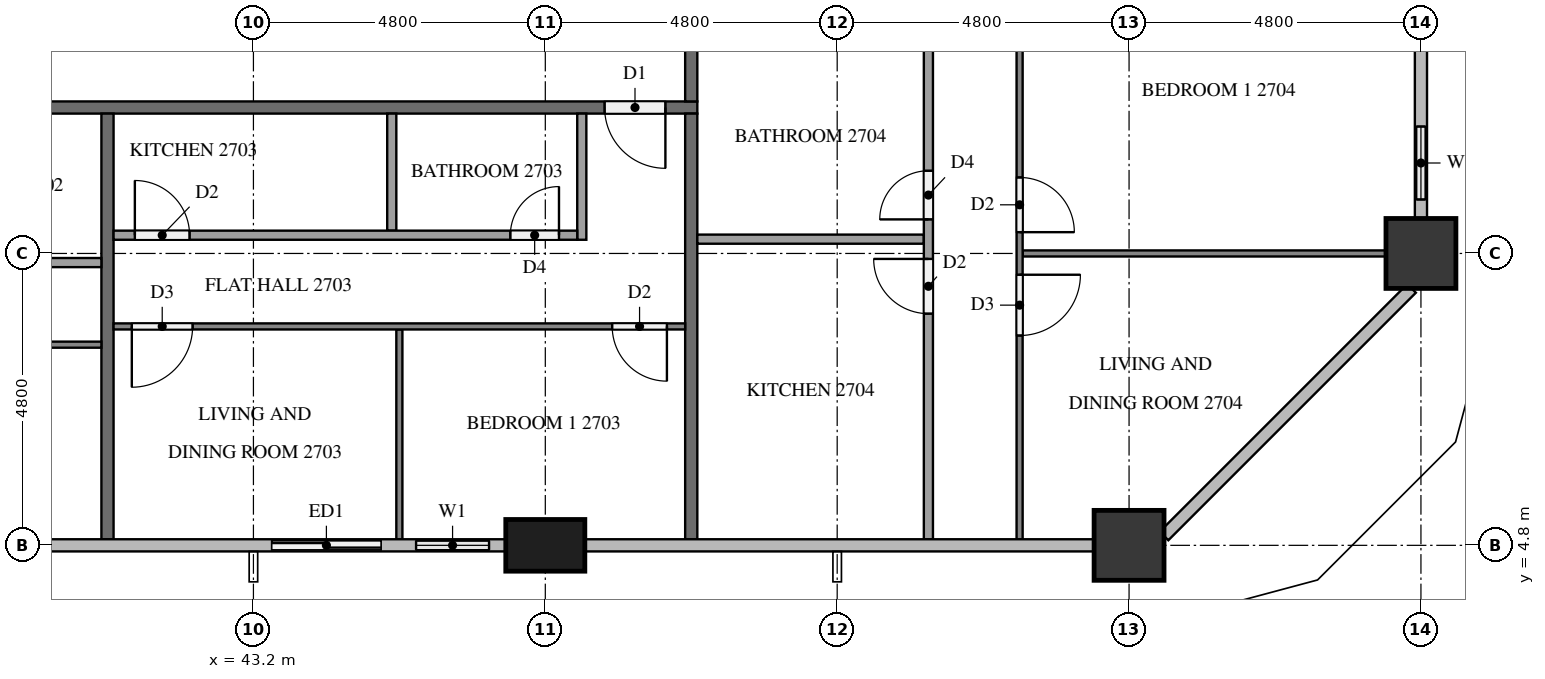
"""IFC4 building model, lengths in metres.
Left out: names, types, materials, properties, quantities, classifications, styles, units other than length and angle.
Written with IfcOpenShell. Run it as: python <this file> out.ifc"""

import sys

from ifc_helpers import new_model, si_unit, direction, frame, frame_2d, origin, origin_2d, place, context, subcontext, project, spatial, rectangle, extrude, element, fill, save


model = new_model("IFC4")
c1 = context("Model", 3, precision=1e-05, world=origin(), true_north=direction((0.0, 1.0)))
c2 = subcontext(c1, "Body", "Model", "MODEL_VIEW")
j1 = project(units=[si_unit("LENGTHUNIT", "METRE"), si_unit("PLANEANGLEUNIT", "RADIAN")], contexts=[c1])
p1 = place(None, origin())
s1 = spatial("IfcSite", under=j1, at=p1, CompositionType="ELEMENT")
p2 = place(p1, origin())
s2 = spatial("IfcBuilding", under=s1, at=p2, CompositionType="ELEMENT")
p3 = place(p2, frame((0.0, 0.0, 106.7)))
s3 = spatial("IfcBuildingStorey", under=s2, at=p3, CompositionType="ELEMENT", Elevation=106.7)
p4 = place(p3, frame((48.0, 4.8, 0.0), z_axis=(0.0, 0.0, 1.0), x_axis=(1.0, 0.0, 0.0)))
e1 = element("IfcColumn", 1, at=p4, inside=s3, PredefinedType="COLUMN", context=c2, shape_type="SweptSolid", body=[
    extrude(rectangle(XDim=1.3, YDim=0.85, at=origin_2d()), origin(), (0.0, 0.0, 1.0), 3.2),
])
for number, where, z_axis, x_axis in (
    (2, (57.6, 4.8, 0.0), (0.0, 0.0, 1.0), (1.0, 0.0, 0.0)),
    (3, (62.4, 9.6, 0.0), (0.0, 0.0, 1.0), (1.0, 0.0, 0.0)),
):
    element("IfcColumn", number, at=place(p3, frame(where, z_axis=z_axis, x_axis=x_axis)), inside=s3, PredefinedType="COLUMN", context=c2, shape_type="SweptSolid", body=[
        extrude(rectangle(XDim=1.15, YDim=1.15, at=origin_2d()), origin(), (0.0, 0.0, 1.0), 3.2),
    ])
p5 = place(p3, frame((43.2, 4.8, 0.0), z_axis=(0.0, 0.0, 1.0), x_axis=(1.0, 0.0, 0.0)))
e4 = element("IfcWall", 4, at=p5, inside=s3, PredefinedType="SOLIDWALL", context=c2, shape_type="SweptSolid", body=[
    extrude(rectangle(XDim=4.15, YDim=0.15, at=frame_2d((2.075, 0.0))), origin(), (0.0, 0.0, 1.0), 3.2),
])
p6 = place(p5, frame((0.3, 0.0, 0.0)))
e5 = element("IfcOpeningElement", 5, at=p6, cuts=e4, PredefinedType="OPENING", context=c2, shape_type="SweptSolid", body=[
    extrude(rectangle(XDim=1.8, YDim=2.4, at=frame_2d((0.9, 1.2))), frame((0.0, 0.085, 0.0), z_axis=(0.0, -1.0, 0.0), x_axis=(1.0, 0.0, 0.0)), (0.0, 0.0, 1.0), 0.17),
])
p7 = place(p5, frame((2.675, 0.0, 0.9)))
e6 = element("IfcOpeningElement", 6, at=p7, cuts=e4, PredefinedType="OPENING", context=c2, shape_type="SweptSolid", body=[
    extrude(rectangle(XDim=1.2, YDim=1.4, at=frame_2d((0.6, 0.7))), frame((0.0, 0.085, 0.0), z_axis=(0.0, -1.0, 0.0), x_axis=(1.0, 0.0, 0.0)), (0.0, 0.0, 1.0), 0.17),
])
p8 = place(p3, frame((62.4, 10.175, 0.0), z_axis=(0.0, 0.0, 1.0), x_axis=(0.0, 1.0, 0.0)))
e7 = element("IfcWall", 7, at=p8, inside=s3, PredefinedType="SOLIDWALL", context=c2, shape_type="SweptSolid", body=[
    extrude(rectangle(XDim=1.825, YDim=0.15, at=frame_2d((0.913, 0.0))), origin(), (0.0, 0.0, 1.0), 3.2),
])
p9 = place(p8, frame((0.312, 0.0, 0.9)))
e8 = element("IfcOpeningElement", 8, at=p9, cuts=e7, PredefinedType="OPENING", context=c2, shape_type="SweptSolid", body=[
    extrude(rectangle(XDim=1.2, YDim=1.4, at=frame_2d((0.6, 0.7))), frame((0.0, 0.085, 0.0), z_axis=(0.0, -1.0, 0.0), x_axis=(1.0, 0.0, 0.0)), (0.0, 0.0, 1.0), 0.17),
])
p10 = place(p3, frame((50.5, 12.0, 0.0), z_axis=(0.0, 0.0, 1.0), x_axis=(-1.0, 0.0, 0.0)))
e9 = element("IfcWall", 9, at=p10, inside=s3, PredefinedType="PARTITIONING", context=c2, shape_type="SweptSolid", body=[
    extrude(rectangle(XDim=38.6, YDim=0.2, at=frame_2d((19.3, 0.0))), origin(), (0.0, 0.0, 1.0), 3.2),
])
p11 = place(p10, frame((37.075, 0.0, 0.0)))
e10 = element("IfcOpeningElement", 10, at=p11, cuts=e9, PredefinedType="OPENING", context=c2, shape_type="SweptSolid", body=[
    extrude(rectangle(XDim=1.0, YDim=2.1, at=frame_2d((0.5, 1.05))), frame((0.0, 0.11, 0.0), z_axis=(0.0, -1.0, 0.0), x_axis=(1.0, 0.0, 0.0)), (0.0, 0.0, 1.0), 0.22),
])
p12 = place(p10, frame((22.675, 0.0, 0.0)))
e11 = element("IfcOpeningElement", 11, at=p12, cuts=e9, PredefinedType="OPENING", context=c2, shape_type="SweptSolid", body=[
    extrude(rectangle(XDim=1.0, YDim=2.1, at=frame_2d((0.5, 1.05))), frame((0.0, 0.11, 0.0), z_axis=(0.0, -1.0, 0.0), x_axis=(1.0, 0.0, 0.0)), (0.0, 0.0, 1.0), 0.22),
])
p13 = place(p10, frame((0.525, 0.0, 0.0)))
e12 = element("IfcOpeningElement", 12, at=p13, cuts=e9, PredefinedType="OPENING", context=c2, shape_type="SweptSolid", body=[
    extrude(rectangle(XDim=1.0, YDim=2.1, at=frame_2d((0.5, 1.05))), frame((0.0, 0.11, 0.0), z_axis=(0.0, -1.0, 0.0), x_axis=(1.0, 0.0, 0.0)), (0.0, 0.0, 1.0), 0.22),
])
p14 = place(p3, frame((50.4, 14.9, 0.0), z_axis=(0.0, 0.0, 1.0), x_axis=(0.0, -1.0, 0.0)))
e13 = element("IfcWall", 13, at=p14, inside=s3, PredefinedType="PARTITIONING", context=c2, shape_type="SweptSolid", body=[
    extrude(rectangle(XDim=2.8, YDim=0.2, at=frame_2d((1.4, 0.0))), origin(), (0.0, 0.0, 1.0), 3.2),
])
p15 = place(p14, frame((0.325, 0.0, 0.0)))
e14 = element("IfcOpeningElement", 14, at=p15, cuts=e13, PredefinedType="OPENING", context=c2, shape_type="SweptSolid", body=[
    extrude(rectangle(XDim=1.0, YDim=2.1, at=frame_2d((0.5, 1.05))), frame((0.0, 0.11, 0.0), z_axis=(0.0, -1.0, 0.0), x_axis=(1.0, 0.0, 0.0)), (0.0, 0.0, 1.0), 0.22),
])
for number, where, z_axis, x_axis in (
    (15, (40.8, 11.9, 0.0), (0.0, 0.0, 1.0), (0.0, -1.0, 0.0)),
    (16, (50.4, 11.9, 0.0), (0.0, 0.0, 1.0), (0.0, -1.0, 0.0)),
):
    element("IfcWall", number, at=place(p3, frame(where, z_axis=z_axis, x_axis=x_axis)), inside=s3, PredefinedType="PARTITIONING", context=c2, shape_type="SweptSolid", body=[
        extrude(rectangle(XDim=7.0, YDim=0.2, at=frame_2d((3.5, 0.0))), origin(), (0.0, 0.0, 1.0), 3.2),
    ])
p16 = place(p3, frame((40.7, 8.1, 0.0), z_axis=(0.0, 0.0, 1.0), x_axis=(-1.0, 0.0, 0.0)))
e17 = element("IfcWall", 17, at=p16, inside=s3, PredefinedType="PARTITIONING", context=c2, shape_type="SweptSolid", body=[
    extrude(rectangle(XDim=14.2, YDim=0.1, at=frame_2d((7.1, 0.0))), origin(), (0.0, 0.0, 1.0), 3.2),
])
p17 = place(p16, frame((13.0, 0.0, 0.0)))
e18 = element("IfcOpeningElement", 18, at=p17, cuts=e17, PredefinedType="OPENING", context=c2, shape_type="SweptSolid", body=[
    extrude(rectangle(XDim=0.9, YDim=2.1, at=frame_2d((0.45, 1.05))), frame((0.0, 0.06, 0.0), z_axis=(0.0, -1.0, 0.0), x_axis=(1.0, 0.0, 0.0)), (0.0, 0.0, 1.0), 0.12),
])
p18 = place(p16, frame((5.05, 0.0, 0.0)))
e19 = element("IfcOpeningElement", 19, at=p18, cuts=e17, PredefinedType="OPENING", context=c2, shape_type="SweptSolid", body=[
    extrude(rectangle(XDim=1.0, YDim=2.1, at=frame_2d((0.5, 1.05))), frame((0.0, 0.06, 0.0), z_axis=(0.0, -1.0, 0.0), x_axis=(1.0, 0.0, 0.0)), (0.0, 0.0, 1.0), 0.12),
])
p19 = place(p16, frame((3.45, 0.0, 0.0)))
e20 = element("IfcOpeningElement", 20, at=p19, cuts=e17, PredefinedType="OPENING", context=c2, shape_type="SweptSolid", body=[
    extrude(rectangle(XDim=0.9, YDim=2.1, at=frame_2d((0.45, 1.05))), frame((0.0, 0.06, 0.0), z_axis=(0.0, -1.0, 0.0), x_axis=(1.0, 0.0, 0.0)), (0.0, 0.0, 1.0), 0.12),
])
p20 = place(p3, frame((28.275, 9.45, 0.0), z_axis=(0.0, 0.0, 1.0), x_axis=(1.0, 0.0, 0.0)))
e21 = element("IfcWall", 21, at=p20, inside=s3, PredefinedType="PARTITIONING", context=c2, shape_type="SweptSolid", body=[
    extrude(rectangle(XDim=12.425, YDim=0.15, at=frame_2d((6.212, 0.0))), origin(), (0.0, 0.0, 1.0), 3.2),
])
p21 = place(p20, frame((0.3, 0.0, 0.0)))
e22 = element("IfcOpeningElement", 22, at=p21, cuts=e21, PredefinedType="OPENING", context=c2, shape_type="SweptSolid", body=[
    extrude(rectangle(XDim=0.8, YDim=2.1, at=frame_2d((0.4, 1.05))), frame((0.0, 0.085, 0.0), z_axis=(0.0, -1.0, 0.0), x_axis=(1.0, 0.0, 0.0)), (0.0, 0.0, 1.0), 0.17),
])
p22 = place(p20, frame((7.377, 0.0, 0.0)))
e23 = element("IfcOpeningElement", 23, at=p22, cuts=e21, PredefinedType="OPENING", context=c2, shape_type="SweptSolid", body=[
    extrude(rectangle(XDim=0.9, YDim=2.1, at=frame_2d((0.45, 1.05))), frame((0.0, 0.085, 0.0), z_axis=(0.0, -1.0, 0.0), x_axis=(1.0, 0.0, 0.0)), (0.0, 0.0, 1.0), 0.17),
])
p23 = place(p20, frame((8.927, 0.0, 0.0)))
e24 = element("IfcOpeningElement", 24, at=p23, cuts=e21, PredefinedType="OPENING", context=c2, shape_type="SweptSolid", body=[
    extrude(rectangle(XDim=0.9, YDim=2.1, at=frame_2d((0.45, 1.05))), frame((0.0, 0.085, 0.0), z_axis=(0.0, -1.0, 0.0), x_axis=(1.0, 0.0, 0.0)), (0.0, 0.0, 1.0), 0.17),
])
p24 = place(p3, frame((45.6, 8.35, 0.0), z_axis=(0.0, 0.0, 1.0), x_axis=(0.0, -1.0, 0.0)))
e25 = element("IfcWall", 25, at=p24, inside=s3, PredefinedType="PARTITIONING", context=c2, shape_type="SweptSolid", body=[
    extrude(rectangle(XDim=3.45, YDim=0.1, at=frame_2d((1.725, 0.0))), origin(), (0.0, 0.0, 1.0), 3.2),
])
p25 = place(p3, frame((50.3, 8.4, 0.0), z_axis=(0.0, 0.0, 1.0), x_axis=(-1.0, 0.0, 0.0)))
e26 = element("IfcWall", 26, at=p25, inside=s3, PredefinedType="PARTITIONING", context=c2, shape_type="SweptSolid", body=[
    extrude(rectangle(XDim=9.4, YDim=0.1, at=frame_2d((4.7, 0.0))), origin(), (0.0, 0.0, 1.0), 3.2),
])
p26 = place(p25, frame((0.3, 0.0, 0.0)))
e27 = element("IfcOpeningElement", 27, at=p26, cuts=e26, PredefinedType="OPENING", context=c2, shape_type="SweptSolid", body=[
    extrude(rectangle(XDim=0.9, YDim=2.1, at=frame_2d((0.45, 1.05))), frame((0.0, 0.06, 0.0), z_axis=(0.0, -1.0, 0.0), x_axis=(1.0, 0.0, 0.0)), (0.0, 0.0, 1.0), 0.12),
])
p27 = place(p25, frame((8.1, 0.0, 0.0)))
e28 = element("IfcOpeningElement", 28, at=p27, cuts=e26, PredefinedType="OPENING", context=c2, shape_type="SweptSolid", body=[
    extrude(rectangle(XDim=1.0, YDim=2.1, at=frame_2d((0.5, 1.05))), frame((0.0, 0.06, 0.0), z_axis=(0.0, -1.0, 0.0), x_axis=(1.0, 0.0, 0.0)), (0.0, 0.0, 1.0), 0.12),
])
p28 = place(p3, frame((45.475, 11.9, 0.0), z_axis=(0.0, 0.0, 1.0), x_axis=(0.0, -1.0, 0.0)))
e29 = element("IfcWall", 29, at=p28, inside=s3, PredefinedType="PARTITIONING", context=c2, shape_type="SweptSolid", body=[
    extrude(rectangle(XDim=1.925, YDim=0.15, at=frame_2d((0.962, 0.0))), origin(), (0.0, 0.0, 1.0), 3.2),
])
p29 = place(p3, frame((48.6, 11.9, 0.0), z_axis=(0.0, 0.0, 1.0), x_axis=(0.0, -1.0, 0.0)))
e30 = element("IfcWall", 30, at=p29, inside=s3, PredefinedType="PARTITIONING", context=c2, shape_type="SweptSolid", body=[
    extrude(rectangle(XDim=2.075, YDim=0.15, at=frame_2d((1.038, 0.0))), origin(), (0.0, 0.0, 1.0), 3.2),
])
p30 = place(p3, frame((40.9, 9.9, 0.0), z_axis=(0.0, 0.0, 1.0), x_axis=(1.0, 0.0, 0.0)))
e31 = element("IfcWall", 31, at=p30, inside=s3, PredefinedType="PARTITIONING", context=c2, shape_type="SweptSolid", body=[
    extrude(rectangle(XDim=7.625, YDim=0.15, at=frame_2d((3.812, 0.0))), origin(), (0.0, 0.0, 1.0), 3.2),
])
p31 = place(p30, frame((6.525, 0.0, 0.0)))
e32 = element("IfcOpeningElement", 32, at=p31, cuts=e31, PredefinedType="OPENING", context=c2, shape_type="SweptSolid", body=[
    extrude(rectangle(XDim=0.8, YDim=2.1, at=frame_2d((0.4, 1.05))), frame((0.0, 0.085, 0.0), z_axis=(0.0, -1.0, 0.0), x_axis=(1.0, 0.0, 0.0)), (0.0, 0.0, 1.0), 0.17),
])
p32 = place(p30, frame((0.35, 0.0, 0.0)))
e33 = element("IfcOpeningElement", 33, at=p32, cuts=e31, PredefinedType="OPENING", context=c2, shape_type="SweptSolid", body=[
    extrude(rectangle(XDim=0.9, YDim=2.1, at=frame_2d((0.45, 1.05))), frame((0.0, 0.085, 0.0), z_axis=(0.0, -1.0, 0.0), x_axis=(1.0, 0.0, 0.0)), (0.0, 0.0, 1.0), 0.17),
])
p33 = place(p3, frame((55.85, 9.6, 0.0), z_axis=(0.0, 0.0, 1.0), x_axis=(1.0, 0.0, 0.0)))
e34 = element("IfcWall", 34, at=p33, inside=s3, PredefinedType="PARTITIONING", context=c2, shape_type="SweptSolid", body=[
    extrude(rectangle(XDim=5.975, YDim=0.1, at=frame_2d((2.987, 0.0))), origin(), (0.0, 0.0, 1.0), 3.2),
])
p34 = place(p3, frame((55.8, 14.9, 0.0), z_axis=(0.0, 0.0, 1.0), x_axis=(0.0, -1.0, 0.0)))
e35 = element("IfcWall", 35, at=p34, inside=s3, PredefinedType="PARTITIONING", context=c2, shape_type="SweptSolid", body=[
    extrude(rectangle(XDim=10.0, YDim=0.1, at=frame_2d((5.0, 0.0))), origin(), (0.0, 0.0, 1.0), 3.2),
])
p35 = place(p34, frame((4.05, 0.0, 0.0)))
e36 = element("IfcOpeningElement", 36, at=p35, cuts=e35, PredefinedType="OPENING", context=c2, shape_type="SweptSolid", body=[
    extrude(rectangle(XDim=0.9, YDim=2.1, at=frame_2d((0.45, 1.05))), frame((0.0, 0.06, 0.0), z_axis=(0.0, -1.0, 0.0), x_axis=(1.0, 0.0, 0.0)), (0.0, 0.0, 1.0), 0.12),
])
p36 = place(p34, frame((5.65, 0.0, 0.0)))
e37 = element("IfcOpeningElement", 37, at=p36, cuts=e35, PredefinedType="OPENING", context=c2, shape_type="SweptSolid", body=[
    extrude(rectangle(XDim=1.0, YDim=2.1, at=frame_2d((0.5, 1.05))), frame((0.0, 0.06, 0.0), z_axis=(0.0, -1.0, 0.0), x_axis=(1.0, 0.0, 0.0)), (0.0, 0.0, 1.0), 0.12),
])
p37 = place(p3, frame((50.5, 9.835, 0.0), z_axis=(0.0, 0.0, 1.0), x_axis=(1.0, 0.0, 0.0)))
e38 = element("IfcWall", 38, at=p37, inside=s3, PredefinedType="PARTITIONING", context=c2, shape_type="SweptSolid", body=[
    extrude(rectangle(XDim=3.725, YDim=0.15, at=frame_2d((1.863, 0.0))), origin(), (0.0, 0.0, 1.0), 3.2),
])
p38 = place(p3, frame((54.3, 4.9, 0.0), z_axis=(0.0, 0.0, 1.0), x_axis=(0.0, 1.0, 0.0)))
e39 = element("IfcWall", 39, at=p38, inside=s3, PredefinedType="PARTITIONING", context=c2, shape_type="SweptSolid", body=[
    extrude(rectangle(XDim=8.225, YDim=0.15, at=frame_2d((4.113, 0.0))), origin(), (0.0, 0.0, 1.0), 3.2),
])
p39 = place(p38, frame((5.26, 0.0, 0.0)))
e40 = element("IfcOpeningElement", 40, at=p39, cuts=e39, PredefinedType="OPENING", context=c2, shape_type="SweptSolid", body=[
    extrude(rectangle(XDim=0.8, YDim=2.1, at=frame_2d((0.4, 1.05))), frame((0.0, 0.085, 0.0), z_axis=(0.0, -1.0, 0.0), x_axis=(1.0, 0.0, 0.0)), (0.0, 0.0, 1.0), 0.17),
])
p40 = place(p38, frame((3.71, 0.0, 0.0)))
e41 = element("IfcOpeningElement", 41, at=p40, cuts=e39, PredefinedType="OPENING", context=c2, shape_type="SweptSolid", body=[
    extrude(rectangle(XDim=0.9, YDim=2.1, at=frame_2d((0.45, 1.05))), frame((0.0, 0.085, 0.0), z_axis=(0.0, -1.0, 0.0), x_axis=(1.0, 0.0, 0.0)), (0.0, 0.0, 1.0), 0.17),
])
p41 = place(p6, origin())
e42 = element("IfcDoor", 42, at=p41, inside=s3, OperationType="SLIDING_TO_LEFT", PredefinedType="DOOR", context=c2, shape_type="SweptSolid", body=[
    extrude(rectangle(XDim=1.8, YDim=2.4, at=frame_2d((0.9, 1.2))), frame((0.0, 0.025, 0.0), z_axis=(0.0, -1.0, 0.0), x_axis=(1.0, 0.0, 0.0)), (0.0, 0.0, 1.0), 0.05),
])
fill(e5, e42)
p42 = place(p7, origin())
e43 = element("IfcWindow", 43, at=p42, inside=s3, PartitioningType="SINGLE_PANEL", PredefinedType="WINDOW", context=c2, shape_type="SweptSolid", body=[
    extrude(rectangle(XDim=1.2, YDim=1.4, at=frame_2d((0.6, 0.7))), frame((0.0, 0.03, 0.0), z_axis=(0.0, -1.0, 0.0), x_axis=(1.0, 0.0, 0.0)), (0.0, 0.0, 1.0), 0.06),
])
fill(e6, e43)
p43 = place(p9, origin())
e44 = element("IfcWindow", 44, at=p43, inside=s3, PartitioningType="SINGLE_PANEL", PredefinedType="WINDOW", context=c2, shape_type="SweptSolid", body=[
    extrude(rectangle(XDim=1.2, YDim=1.4, at=frame_2d((0.6, 0.7))), frame((0.0, 0.03, 0.0), z_axis=(0.0, -1.0, 0.0), x_axis=(1.0, 0.0, 0.0)), (0.0, 0.0, 1.0), 0.06),
])
fill(e8, e44)
p44 = place(p13, origin())
e45 = element("IfcDoor", 45, at=p44, inside=s3, OperationType="SINGLE_SWING_LEFT", PredefinedType="DOOR", context=c2, shape_type="SweptSolid", body=[
    extrude(rectangle(XDim=1.0, YDim=2.1, at=frame_2d((0.5, 1.05))), frame((0.0, 0.025, 0.0), z_axis=(0.0, -1.0, 0.0), x_axis=(1.0, 0.0, 0.0)), (0.0, 0.0, 1.0), 0.05),
])
fill(e12, e45)
p45 = place(p26, origin())
e46 = element("IfcDoor", 46, at=p45, inside=s3, OperationType="SINGLE_SWING_LEFT", PredefinedType="DOOR", context=c2, shape_type="SweptSolid", body=[
    extrude(rectangle(XDim=0.9, YDim=2.1, at=frame_2d((0.45, 1.05))), frame((0.0, 0.025, 0.0), z_axis=(0.0, -1.0, 0.0), x_axis=(1.0, 0.0, 0.0)), (0.0, 0.0, 1.0), 0.05),
])
fill(e27, e46)
p46 = place(p27, origin())
e47 = element("IfcDoor", 47, at=p46, inside=s3, OperationType="SINGLE_SWING_RIGHT", PredefinedType="DOOR", context=c2, shape_type="SweptSolid", body=[
    extrude(rectangle(XDim=1.0, YDim=2.1, at=frame_2d((0.5, 1.05))), frame((0.0, 0.025, 0.0), z_axis=(0.0, -1.0, 0.0), x_axis=(1.0, 0.0, 0.0)), (0.0, 0.0, 1.0), 0.05),
])
fill(e28, e47)
p47 = place(p31, origin())
e48 = element("IfcDoor", 48, at=p47, inside=s3, OperationType="SINGLE_SWING_RIGHT", PredefinedType="DOOR", context=c2, shape_type="SweptSolid", body=[
    extrude(rectangle(XDim=0.8, YDim=2.1, at=frame_2d((0.4, 1.05))), frame((0.0, 0.025, 0.0), z_axis=(0.0, -1.0, 0.0), x_axis=(1.0, 0.0, 0.0)), (0.0, 0.0, 1.0), 0.05),
])
fill(e32, e48)
p48 = place(p32, origin())
e49 = element("IfcDoor", 49, at=p48, inside=s3, OperationType="SINGLE_SWING_LEFT", PredefinedType="DOOR", context=c2, shape_type="SweptSolid", body=[
    extrude(rectangle(XDim=0.9, YDim=2.1, at=frame_2d((0.45, 1.05))), frame((0.0, 0.025, 0.0), z_axis=(0.0, -1.0, 0.0), x_axis=(1.0, 0.0, 0.0)), (0.0, 0.0, 1.0), 0.05),
])
fill(e33, e49)
p49 = place(p35, origin())
e50 = element("IfcDoor", 50, at=p49, inside=s3, OperationType="SINGLE_SWING_RIGHT", PredefinedType="DOOR", context=c2, shape_type="SweptSolid", body=[
    extrude(rectangle(XDim=0.9, YDim=2.1, at=frame_2d((0.45, 1.05))), frame((0.0, 0.025, 0.0), z_axis=(0.0, -1.0, 0.0), x_axis=(1.0, 0.0, 0.0)), (0.0, 0.0, 1.0), 0.05),
])
fill(e36, e50)
p50 = place(p36, origin())
e51 = element("IfcDoor", 51, at=p50, inside=s3, OperationType="SINGLE_SWING_LEFT", PredefinedType="DOOR", context=c2, shape_type="SweptSolid", body=[
    extrude(rectangle(XDim=1.0, YDim=2.1, at=frame_2d((0.5, 1.05))), frame((0.0, 0.025, 0.0), z_axis=(0.0, -1.0, 0.0), x_axis=(1.0, 0.0, 0.0)), (0.0, 0.0, 1.0), 0.05),
])
fill(e37, e51)
p51 = place(p39, origin())
e52 = element("IfcDoor", 52, at=p51, inside=s3, OperationType="SINGLE_SWING_LEFT", PredefinedType="DOOR", context=c2, shape_type="SweptSolid", body=[
    extrude(rectangle(XDim=0.8, YDim=2.1, at=frame_2d((0.4, 1.05))), frame((0.0, 0.025, 0.0), z_axis=(0.0, -1.0, 0.0), x_axis=(1.0, 0.0, 0.0)), (0.0, 0.0, 1.0), 0.05),
])
fill(e40, e52)
p52 = place(p40, origin())
e53 = element("IfcDoor", 53, at=p52, inside=s3, OperationType="SINGLE_SWING_RIGHT", PredefinedType="DOOR", context=c2, shape_type="SweptSolid", body=[
    extrude(rectangle(XDim=0.9, YDim=2.1, at=frame_2d((0.45, 1.05))), frame((0.0, 0.025, 0.0), z_axis=(0.0, -1.0, 0.0), x_axis=(1.0, 0.0, 0.0)), (0.0, 0.0, 1.0), 0.05),
])
fill(e41, e53)
save(model, sys.argv[1])
